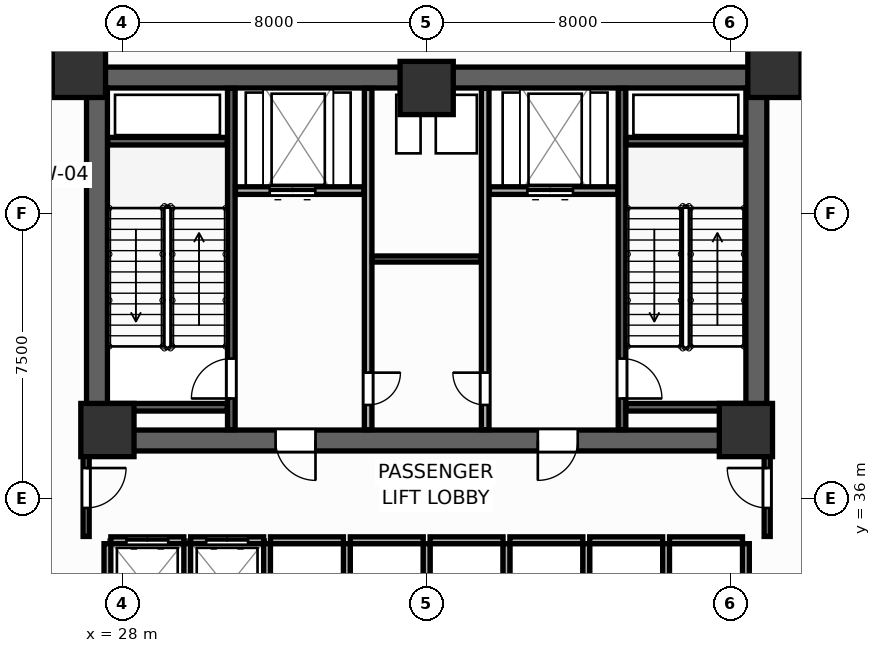
"""IFC4 building model, lengths in metres.
Left out: names, types, materials, properties, quantities, classifications, styles, units other than length and angle.
Written with IfcOpenShell. Run it as: python <this file> out.ifc"""

import sys

from ifc_helpers import new_model, si_unit, direction, frame, frame_2d, origin, origin_2d, place, context, subcontext, project, spatial, rectangle, extrude, source, transform, mapped, element, fill, save


model = new_model("IFC4")
c1 = context("Model", 3, precision=1e-05, world=origin(), true_north=direction((0.0, 1.0)))
c2 = subcontext(c1, "Body", "Model", "MODEL_VIEW")
j1 = project(units=[si_unit("LENGTHUNIT", "METRE"), si_unit("PLANEANGLEUNIT", "RADIAN")], contexts=[c1])
p1 = place(None, origin())
s1 = spatial("IfcSite", under=j1, at=p1, CompositionType="ELEMENT")
p2 = place(p1, origin())
s2 = spatial("IfcBuilding", under=s1, at=p2, CompositionType="ELEMENT")
p3 = place(p2, frame((0.0, 0.0, 4.8)))
s3 = spatial("IfcBuildingStorey", under=s2, at=p3, CompositionType="ELEMENT", Elevation=4.8)
p4 = place(p3, frame((27.05, 47.075, 0.0), z_axis=(0.0, 0.0, 1.0), x_axis=(1.0, 0.0, 0.0)))
e1 = element("IfcWall", 1, at=p4, inside=s3, PredefinedType="SHEAR", context=c2, shape_type="SweptSolid", body=[
    extrude(rectangle(XDim=17.9, YDim=0.55, at=frame_2d((8.95, 0.0))), origin(), (0.0, 0.0, 1.0), 4.8),
])
p5 = place(p3, frame((27.05, 37.525, 0.0), z_axis=(0.0, 0.0, 1.0), x_axis=(1.0, 0.0, 0.0)))
e2 = element("IfcWall", 2, at=p5, inside=s3, PredefinedType="SHEAR", context=c2, shape_type="SweptSolid", body=[
    extrude(rectangle(XDim=17.9, YDim=0.55, at=frame_2d((8.95, 0.0))), origin(), (0.0, 0.0, 1.0), 4.8),
])
p6 = place(p5, frame((4.975, 0.0, 0.0)))
e3 = element("IfcOpeningElement", 3, at=p6, cuts=e2, PredefinedType="OPENING", context=c2, shape_type="SweptSolid", body=[
    extrude(rectangle(XDim=1.05, YDim=2.1, at=frame_2d((0.525, 1.05))), frame((0.0, 0.285, 0.0), z_axis=(0.0, -1.0, 0.0), x_axis=(1.0, 0.0, 0.0)), (0.0, 0.0, 1.0), 0.57),
])
p7 = place(p5, frame((11.875, 0.0, 0.0)))
e4 = element("IfcOpeningElement", 4, at=p7, cuts=e2, PredefinedType="OPENING", context=c2, shape_type="SweptSolid", body=[
    extrude(rectangle(XDim=1.05, YDim=2.1, at=frame_2d((0.525, 1.05))), frame((0.0, 0.285, 0.0), z_axis=(0.0, -1.0, 0.0), x_axis=(1.0, 0.0, 0.0)), (0.0, 0.0, 1.0), 0.57),
])
for number, where, z_axis, x_axis in (
    (5, (27.325, 37.8, 0.0), (0.0, 0.0, 1.0), (0.0, 1.0, 0.0)),
    (6, (44.675, 37.8, 0.0), (0.0, 0.0, 1.0), (0.0, 1.0, 0.0)),
):
    element("IfcWall", number, at=place(p3, frame(where, z_axis=z_axis, x_axis=x_axis)), inside=s3, PredefinedType="SHEAR", context=c2, shape_type="SweptSolid", body=[
        extrude(rectangle(XDim=9.0, YDim=0.55, at=frame_2d((4.5, 0.0))), origin(), (0.0, 0.0, 1.0), 4.8),
    ])
m1 = source(origin(), c2, "Body", "SweptSolid", [
    extrude(rectangle(XDim=1.4, YDim=1.4, at=origin_2d()), origin(), (0.0, 0.0, 1.0), 4.8),
])
for number, where, z_axis, x_axis in (
    (7, (26.85, 47.25, 0.0), (0.0, 0.0, 1.0), (1.0, 0.0, 0.0)),
    (8, (45.15, 47.25, 0.0), (0.0, 0.0, 1.0), (1.0, 0.0, 0.0)),
    (9, (27.6, 37.8, 0.0), (0.0, 0.0, 1.0), (1.0, 0.0, 0.0)),
    (10, (44.4, 37.8, 0.0), (0.0, 0.0, 1.0), (1.0, 0.0, 0.0)),
    (11, (36.0, 46.8, 0.0), (0.0, 0.0, 1.0), (1.0, 0.0, 0.0)),
):
    element("IfcColumn", number, at=place(p3, frame(where, z_axis=z_axis, x_axis=x_axis)), inside=s3, PredefinedType="COLUMN", context=c2, shape_type="MappedRepresentation", body=[
        mapped(m1, transform((0.0, 0.0, 0.0), scale=1.0)),
    ])
p8 = place(p3, frame((30.86, 37.81, 0.0), z_axis=(0.0, 0.0, 1.0), x_axis=(0.0, 1.0, 0.0)))
e12 = element("IfcWall", 12, at=p8, inside=s3, PredefinedType="SHEAR", context=c2, shape_type="SweptSolid", body=[
    extrude(rectangle(XDim=8.98, YDim=0.2, at=frame_2d((4.49, 0.0))), origin(), (0.0, 0.0, 1.0), 4.8),
])
p9 = place(p8, frame((0.82, 0.0, 0.0)))
e13 = element("IfcOpeningElement", 13, at=p9, cuts=e12, PredefinedType="OPENING", context=c2, shape_type="SweptSolid", body=[
    extrude(rectangle(XDim=1.05, YDim=2.1, at=frame_2d((0.525, 1.05))), frame((0.0, 0.11, 0.0), z_axis=(0.0, -1.0, 0.0), x_axis=(1.0, 0.0, 0.0)), (0.0, 0.0, 1.0), 0.22),
])
for number, where, z_axis, x_axis in (
    (14, (27.61, 45.4, 0.0), (0.0, 0.0, 1.0), (1.0, 0.0, 0.0)),
    (15, (27.61, 38.4, 0.0), (0.0, 0.0, 1.0), (1.0, 0.0, 0.0)),
):
    element("IfcWall", number, at=place(p3, frame(where, z_axis=z_axis, x_axis=x_axis)), inside=s3, PredefinedType="SHEAR", context=c2, shape_type="SweptSolid", body=[
        extrude(rectangle(XDim=3.14, YDim=0.2, at=frame_2d((1.57, 0.0))), origin(), (0.0, 0.0, 1.0), 4.8),
    ])
p10 = place(p3, frame((41.14, 37.81, 0.0), z_axis=(0.0, 0.0, 1.0), x_axis=(0.0, 1.0, 0.0)))
e16 = element("IfcWall", 16, at=p10, inside=s3, PredefinedType="SHEAR", context=c2, shape_type="SweptSolid", body=[
    extrude(rectangle(XDim=8.98, YDim=0.2, at=frame_2d((4.49, 0.0))), origin(), (0.0, 0.0, 1.0), 4.8),
])
p11 = place(p10, frame((0.82, 0.0, 0.0)))
e17 = element("IfcOpeningElement", 17, at=p11, cuts=e16, PredefinedType="OPENING", context=c2, shape_type="SweptSolid", body=[
    extrude(rectangle(XDim=1.05, YDim=2.1, at=frame_2d((0.525, 1.05))), frame((0.0, 0.11, 0.0), z_axis=(0.0, -1.0, 0.0), x_axis=(1.0, 0.0, 0.0)), (0.0, 0.0, 1.0), 0.22),
])
for number, where, z_axis, x_axis in (
    (18, (41.25, 45.4, 0.0), (0.0, 0.0, 1.0), (1.0, 0.0, 0.0)),
    (19, (41.25, 38.4, 0.0), (0.0, 0.0, 1.0), (1.0, 0.0, 0.0)),
):
    element("IfcWall", number, at=place(p3, frame(where, z_axis=z_axis, x_axis=x_axis)), inside=s3, PredefinedType="SHEAR", context=c2, shape_type="SweptSolid", body=[
        extrude(rectangle(XDim=3.14, YDim=0.2, at=frame_2d((1.57, 0.0))), origin(), (0.0, 0.0, 1.0), 4.8),
    ])
p12 = place(p3, frame((30.97, 44.1, 0.0), z_axis=(0.0, 0.0, 1.0), x_axis=(1.0, 0.0, 0.0)))
e20 = element("IfcWall", 20, at=p12, inside=s3, PredefinedType="PARTITIONING", context=c2, shape_type="SweptSolid", body=[
    extrude(rectangle(XDim=3.38, YDim=0.2, at=frame_2d((1.69, 0.0))), origin(), (0.0, 0.0, 1.0), 4.52),
])
p13 = place(p12, frame((0.9, 0.0, 0.0)))
e21 = element("IfcOpeningElement", 21, at=p13, cuts=e20, PredefinedType="OPENING", context=c2, shape_type="SweptSolid", body=[
    extrude(rectangle(XDim=1.2, YDim=2.1, at=frame_2d((0.6, 1.05))), frame((0.0, 0.11, 0.0), z_axis=(0.0, -1.0, 0.0), x_axis=(1.0, 0.0, 0.0)), (0.0, 0.0, 1.0), 0.22),
])
p14 = place(p3, frame((37.65, 44.1, 0.0), z_axis=(0.0, 0.0, 1.0), x_axis=(1.0, 0.0, 0.0)))
e22 = element("IfcWall", 22, at=p14, inside=s3, PredefinedType="PARTITIONING", context=c2, shape_type="SweptSolid", body=[
    extrude(rectangle(XDim=3.38, YDim=0.2, at=frame_2d((1.69, 0.0))), origin(), (0.0, 0.0, 1.0), 4.52),
])
p15 = place(p14, frame((1.0, 0.0, 0.0)))
e23 = element("IfcOpeningElement", 23, at=p15, cuts=e22, PredefinedType="OPENING", context=c2, shape_type="SweptSolid", body=[
    extrude(rectangle(XDim=1.2, YDim=2.1, at=frame_2d((0.6, 1.05))), frame((0.0, 0.11, 0.0), z_axis=(0.0, -1.0, 0.0), x_axis=(1.0, 0.0, 0.0)), (0.0, 0.0, 1.0), 0.22),
])
p16 = place(p3, frame((34.46, 37.81, 0.0), z_axis=(0.0, 0.0, 1.0), x_axis=(0.0, 1.0, 0.0)))
e24 = element("IfcWall", 24, at=p16, inside=s3, PredefinedType="PARTITIONING", context=c2, shape_type="SweptSolid", body=[
    extrude(rectangle(XDim=8.98, YDim=0.2, at=frame_2d((4.49, 0.0))), origin(), (0.0, 0.0, 1.0), 4.52),
])
p17 = place(p16, frame((0.65, 0.0, 0.0)))
e25 = element("IfcOpeningElement", 25, at=p17, cuts=e24, PredefinedType="OPENING", context=c2, shape_type="SweptSolid", body=[
    extrude(rectangle(XDim=0.85, YDim=2.05, at=frame_2d((0.425, 1.025))), frame((0.0, 0.11, 0.0), z_axis=(0.0, -1.0, 0.0), x_axis=(1.0, 0.0, 0.0)), (0.0, 0.0, 1.0), 0.22),
])
p18 = place(p3, frame((37.54, 37.81, 0.0), z_axis=(0.0, 0.0, 1.0), x_axis=(0.0, 1.0, 0.0)))
e26 = element("IfcWall", 26, at=p18, inside=s3, PredefinedType="PARTITIONING", context=c2, shape_type="SweptSolid", body=[
    extrude(rectangle(XDim=8.98, YDim=0.2, at=frame_2d((4.49, 0.0))), origin(), (0.0, 0.0, 1.0), 4.52),
])
p19 = place(p18, frame((0.65, 0.0, 0.0)))
e27 = element("IfcOpeningElement", 27, at=p19, cuts=e26, PredefinedType="OPENING", context=c2, shape_type="SweptSolid", body=[
    extrude(rectangle(XDim=0.85, YDim=2.05, at=frame_2d((0.425, 1.025))), frame((0.0, 0.11, 0.0), z_axis=(0.0, -1.0, 0.0), x_axis=(1.0, 0.0, 0.0)), (0.0, 0.0, 1.0), 0.22),
])
p20 = place(p3, frame((34.57, 42.3, 0.0), z_axis=(0.0, 0.0, 1.0), x_axis=(1.0, 0.0, 0.0)))
e28 = element("IfcWall", 28, at=p20, inside=s3, PredefinedType="PARTITIONING", context=c2, shape_type="SweptSolid", body=[
    extrude(rectangle(XDim=2.86, YDim=0.16, at=frame_2d((1.43, 0.0))), origin(), (0.0, 0.0, 1.0), 4.52),
])
p21 = place(p3, frame((27.69, 34.9, 0.0), z_axis=(0.0, 0.0, 1.0), x_axis=(1.0, 0.0, 0.0)))
e29 = element("IfcWall", 29, at=p21, inside=s3, PredefinedType="PARTITIONING", context=c2, shape_type="SweptSolid", body=[
    extrude(rectangle(XDim=1.92, YDim=0.18, at=frame_2d((0.96, 0.0))), origin(), (0.0, 0.0, 1.0), 4.52),
])
p22 = place(p21, frame((0.41, 0.0, 0.0)))
e30 = element("IfcOpeningElement", 30, at=p22, cuts=e29, PredefinedType="OPENING", context=c2, shape_type="SweptSolid", body=[
    extrude(rectangle(XDim=1.1, YDim=2.1, at=frame_2d((0.55, 1.05))), frame((0.0, 0.1, 0.0), z_axis=(0.0, -1.0, 0.0), x_axis=(1.0, 0.0, 0.0)), (0.0, 0.0, 1.0), 0.2),
])
p23 = place(p3, frame((27.6, 32.49, 0.0), z_axis=(0.0, 0.0, 1.0), x_axis=(0.0, 1.0, 0.0)))
e31 = element("IfcWall", 31, at=p23, inside=s3, PredefinedType="PARTITIONING", context=c2, shape_type="SweptSolid", body=[
    extrude(rectangle(XDim=2.32, YDim=0.18, at=frame_2d((1.16, 0.0))), origin(), (0.0, 0.0, 1.0), 4.52),
])
p24 = place(p3, frame((29.79, 34.9, 0.0), z_axis=(0.0, 0.0, 1.0), x_axis=(1.0, 0.0, 0.0)))
e32 = element("IfcWall", 32, at=p24, inside=s3, PredefinedType="PARTITIONING", context=c2, shape_type="SweptSolid", body=[
    extrude(rectangle(XDim=1.92, YDim=0.18, at=frame_2d((0.96, 0.0))), origin(), (0.0, 0.0, 1.0), 4.52),
])
p25 = place(p24, frame((0.41, 0.0, 0.0)))
e33 = element("IfcOpeningElement", 33, at=p25, cuts=e32, PredefinedType="OPENING", context=c2, shape_type="SweptSolid", body=[
    extrude(rectangle(XDim=1.1, YDim=2.1, at=frame_2d((0.55, 1.05))), frame((0.0, 0.1, 0.0), z_axis=(0.0, -1.0, 0.0), x_axis=(1.0, 0.0, 0.0)), (0.0, 0.0, 1.0), 0.2),
])
p26 = place(p3, frame((29.7, 32.49, 0.0), z_axis=(0.0, 0.0, 1.0), x_axis=(0.0, 1.0, 0.0)))
e34 = element("IfcWall", 34, at=p26, inside=s3, PredefinedType="PARTITIONING", context=c2, shape_type="SweptSolid", body=[
    extrude(rectangle(XDim=2.32, YDim=0.18, at=frame_2d((1.16, 0.0))), origin(), (0.0, 0.0, 1.0), 4.52),
])
p27 = place(p3, frame((31.89, 34.9, 0.0), z_axis=(0.0, 0.0, 1.0), x_axis=(1.0, 0.0, 0.0)))
e35 = element("IfcWall", 35, at=p27, inside=s3, PredefinedType="PARTITIONING", context=c2, shape_type="SweptSolid", body=[
    extrude(rectangle(XDim=1.92, YDim=0.18, at=frame_2d((0.96, 0.0))), origin(), (0.0, 0.0, 1.0), 4.52),
])
p28 = place(p3, frame((31.8, 32.49, 0.0), z_axis=(0.0, 0.0, 1.0), x_axis=(0.0, 1.0, 0.0)))
e36 = element("IfcWall", 36, at=p28, inside=s3, PredefinedType="PARTITIONING", context=c2, shape_type="SweptSolid", body=[
    extrude(rectangle(XDim=2.32, YDim=0.18, at=frame_2d((1.16, 0.0))), origin(), (0.0, 0.0, 1.0), 4.52),
])
p29 = place(p3, frame((33.99, 34.9, 0.0), z_axis=(0.0, 0.0, 1.0), x_axis=(1.0, 0.0, 0.0)))
e37 = element("IfcWall", 37, at=p29, inside=s3, PredefinedType="PARTITIONING", context=c2, shape_type="SweptSolid", body=[
    extrude(rectangle(XDim=1.92, YDim=0.18, at=frame_2d((0.96, 0.0))), origin(), (0.0, 0.0, 1.0), 4.52),
])
p30 = place(p3, frame((33.9, 32.49, 0.0), z_axis=(0.0, 0.0, 1.0), x_axis=(0.0, 1.0, 0.0)))
e38 = element("IfcWall", 38, at=p30, inside=s3, PredefinedType="PARTITIONING", context=c2, shape_type="SweptSolid", body=[
    extrude(rectangle(XDim=2.32, YDim=0.18, at=frame_2d((1.16, 0.0))), origin(), (0.0, 0.0, 1.0), 4.52),
])
p31 = place(p3, frame((36.09, 34.9, 0.0), z_axis=(0.0, 0.0, 1.0), x_axis=(1.0, 0.0, 0.0)))
e39 = element("IfcWall", 39, at=p31, inside=s3, PredefinedType="PARTITIONING", context=c2, shape_type="SweptSolid", body=[
    extrude(rectangle(XDim=1.92, YDim=0.18, at=frame_2d((0.96, 0.0))), origin(), (0.0, 0.0, 1.0), 4.52),
])
p32 = place(p3, frame((36.0, 32.49, 0.0), z_axis=(0.0, 0.0, 1.0), x_axis=(0.0, 1.0, 0.0)))
e40 = element("IfcWall", 40, at=p32, inside=s3, PredefinedType="PARTITIONING", context=c2, shape_type="SweptSolid", body=[
    extrude(rectangle(XDim=2.32, YDim=0.18, at=frame_2d((1.16, 0.0))), origin(), (0.0, 0.0, 1.0), 4.52),
])
p33 = place(p3, frame((38.19, 34.9, 0.0), z_axis=(0.0, 0.0, 1.0), x_axis=(1.0, 0.0, 0.0)))
e41 = element("IfcWall", 41, at=p33, inside=s3, PredefinedType="PARTITIONING", context=c2, shape_type="SweptSolid", body=[
    extrude(rectangle(XDim=1.92, YDim=0.18, at=frame_2d((0.96, 0.0))), origin(), (0.0, 0.0, 1.0), 4.52),
])
p34 = place(p3, frame((38.1, 32.49, 0.0), z_axis=(0.0, 0.0, 1.0), x_axis=(0.0, 1.0, 0.0)))
e42 = element("IfcWall", 42, at=p34, inside=s3, PredefinedType="PARTITIONING", context=c2, shape_type="SweptSolid", body=[
    extrude(rectangle(XDim=2.32, YDim=0.18, at=frame_2d((1.16, 0.0))), origin(), (0.0, 0.0, 1.0), 4.52),
])
p35 = place(p3, frame((40.29, 34.9, 0.0), z_axis=(0.0, 0.0, 1.0), x_axis=(1.0, 0.0, 0.0)))
e43 = element("IfcWall", 43, at=p35, inside=s3, PredefinedType="PARTITIONING", context=c2, shape_type="SweptSolid", body=[
    extrude(rectangle(XDim=1.92, YDim=0.18, at=frame_2d((0.96, 0.0))), origin(), (0.0, 0.0, 1.0), 4.52),
])
p36 = place(p3, frame((40.2, 32.49, 0.0), z_axis=(0.0, 0.0, 1.0), x_axis=(0.0, 1.0, 0.0)))
e44 = element("IfcWall", 44, at=p36, inside=s3, PredefinedType="PARTITIONING", context=c2, shape_type="SweptSolid", body=[
    extrude(rectangle(XDim=2.32, YDim=0.18, at=frame_2d((1.16, 0.0))), origin(), (0.0, 0.0, 1.0), 4.52),
])
p37 = place(p3, frame((42.39, 34.9, 0.0), z_axis=(0.0, 0.0, 1.0), x_axis=(1.0, 0.0, 0.0)))
e45 = element("IfcWall", 45, at=p37, inside=s3, PredefinedType="PARTITIONING", context=c2, shape_type="SweptSolid", body=[
    extrude(rectangle(XDim=1.92, YDim=0.18, at=frame_2d((0.96, 0.0))), origin(), (0.0, 0.0, 1.0), 4.52),
])
for number, where, z_axis, x_axis in (
    (46, (42.3, 32.49, 0.0), (0.0, 0.0, 1.0), (0.0, 1.0, 0.0)),
    (47, (44.4, 32.49, 0.0), (0.0, 0.0, 1.0), (0.0, 1.0, 0.0)),
):
    element("IfcWall", number, at=place(p3, frame(where, z_axis=z_axis, x_axis=x_axis)), inside=s3, PredefinedType="PARTITIONING", context=c2, shape_type="SweptSolid", body=[
        extrude(rectangle(XDim=2.32, YDim=0.18, at=frame_2d((1.16, 0.0))), origin(), (0.0, 0.0, 1.0), 4.52),
    ])
p38 = place(p3, frame((27.04, 35.0, 0.0), z_axis=(0.0, 0.0, 1.0), x_axis=(0.0, 1.0, 0.0)))
e48 = element("IfcWall", 48, at=p38, inside=s3, PredefinedType="PARTITIONING", context=c2, shape_type="SweptSolid", body=[
    extrude(rectangle(XDim=2.65, YDim=0.16, at=frame_2d((1.325, 0.0))), origin(), (0.0, 0.0, 1.0), 4.52),
])
p39 = place(p38, frame((0.75, 0.0, 0.0)))
e49 = element("IfcOpeningElement", 49, at=p39, cuts=e48, PredefinedType="OPENING", context=c2, shape_type="SweptSolid", body=[
    extrude(rectangle(XDim=1.05, YDim=2.1, at=frame_2d((0.525, 1.05))), frame((0.0, 0.09, 0.0), z_axis=(0.0, -1.0, 0.0), x_axis=(1.0, 0.0, 0.0)), (0.0, 0.0, 1.0), 0.18),
])
p40 = place(p3, frame((44.96, 35.0, 0.0), z_axis=(0.0, 0.0, 1.0), x_axis=(0.0, 1.0, 0.0)))
e50 = element("IfcWall", 50, at=p40, inside=s3, PredefinedType="PARTITIONING", context=c2, shape_type="SweptSolid", body=[
    extrude(rectangle(XDim=2.65, YDim=0.16, at=frame_2d((1.325, 0.0))), origin(), (0.0, 0.0, 1.0), 4.52),
])
p41 = place(p40, frame((0.75, 0.0, 0.0)))
e51 = element("IfcOpeningElement", 51, at=p41, cuts=e50, PredefinedType="OPENING", context=c2, shape_type="SweptSolid", body=[
    extrude(rectangle(XDim=1.05, YDim=2.1, at=frame_2d((0.525, 1.05))), frame((0.0, 0.09, 0.0), z_axis=(0.0, -1.0, 0.0), x_axis=(1.0, 0.0, 0.0)), (0.0, 0.0, 1.0), 0.18),
])
p42 = place(p3, frame((27.035, 47.34, 0.0), z_axis=(0.0, 0.0, 1.0), x_axis=(0.0, 1.0, 0.0)))
e52 = element("IfcWall", 52, at=p42, inside=s3, PredefinedType="PARTITIONING", context=c2, shape_type="SweptSolid", body=[
    extrude(rectangle(XDim=11.64, YDim=0.16, at=frame_2d((5.82, 0.0))), origin(), (0.0, 0.0, 1.0), 4.52),
])
p43 = place(p42, frame((5.238, 0.0, 0.0)))
e53 = element("IfcOpeningElement", 53, at=p43, cuts=e52, PredefinedType="OPENING", context=c2, shape_type="SweptSolid", body=[
    extrude(rectangle(XDim=0.95, YDim=2.05, at=frame_2d((0.475, 1.025))), frame((0.0, 0.09, 0.0), z_axis=(0.0, -1.0, 0.0), x_axis=(1.0, 0.0, 0.0)), (0.0, 0.0, 1.0), 0.18),
])
p44 = place(p3, frame((44.965, 47.34, 0.0), z_axis=(0.0, 0.0, 1.0), x_axis=(0.0, 1.0, 0.0)))
e54 = element("IfcWall", 54, at=p44, inside=s3, PredefinedType="PARTITIONING", context=c2, shape_type="SweptSolid", body=[
    extrude(rectangle(XDim=11.64, YDim=0.16, at=frame_2d((5.82, 0.0))), origin(), (0.0, 0.0, 1.0), 4.52),
])
p45 = place(p9, origin())
e55 = element("IfcDoor", 55, at=p45, inside=s3, OperationType="SINGLE_SWING_LEFT", PredefinedType="DOOR", context=c2, shape_type="SweptSolid", body=[
    extrude(rectangle(XDim=1.05, YDim=2.1, at=frame_2d((0.525, 1.05))), frame((0.0, 0.025, 0.0), z_axis=(0.0, -1.0, 0.0), x_axis=(1.0, 0.0, 0.0)), (0.0, 0.0, 1.0), 0.05),
])
fill(e13, e55)
p46 = place(p11, frame((1.05, 0.0, 0.0), z_axis=(0.0, 0.0, 1.0), x_axis=(-1.0, 0.0, 0.0)))
e56 = element("IfcDoor", 56, at=p46, inside=s3, OperationType="SINGLE_SWING_RIGHT", PredefinedType="DOOR", context=c2, shape_type="SweptSolid", body=[
    extrude(rectangle(XDim=1.05, YDim=2.1, at=frame_2d((0.525, 1.05))), frame((0.0, 0.025, 0.0), z_axis=(0.0, -1.0, 0.0), x_axis=(1.0, 0.0, 0.0)), (0.0, 0.0, 1.0), 0.05),
])
fill(e17, e56)
p47 = place(p13, origin())
e57 = element("IfcDoor", 57, at=p47, inside=s3, OperationType="DOUBLE_DOOR_SLIDING", PredefinedType="DOOR", context=c2, shape_type="SweptSolid", body=[
    extrude(rectangle(XDim=1.2, YDim=2.1, at=frame_2d((0.6, 1.05))), frame((0.0, 0.025, 0.0), z_axis=(0.0, -1.0, 0.0), x_axis=(1.0, 0.0, 0.0)), (0.0, 0.0, 1.0), 0.05),
])
fill(e21, e57)
p48 = place(p15, origin())
e58 = element("IfcDoor", 58, at=p48, inside=s3, OperationType="DOUBLE_DOOR_SLIDING", PredefinedType="DOOR", context=c2, shape_type="SweptSolid", body=[
    extrude(rectangle(XDim=1.2, YDim=2.1, at=frame_2d((0.6, 1.05))), frame((0.0, 0.025, 0.0), z_axis=(0.0, -1.0, 0.0), x_axis=(1.0, 0.0, 0.0)), (0.0, 0.0, 1.0), 0.05),
])
fill(e23, e58)
p49 = place(p17, frame((0.85, 0.0, 0.0), z_axis=(0.0, 0.0, 1.0), x_axis=(-1.0, 0.0, 0.0)))
e59 = element("IfcDoor", 59, at=p49, inside=s3, OperationType="SINGLE_SWING_LEFT", PredefinedType="DOOR", context=c2, shape_type="SweptSolid", body=[
    extrude(rectangle(XDim=0.85, YDim=2.05, at=frame_2d((0.425, 1.025))), frame((0.0, 0.025, 0.0), z_axis=(0.0, -1.0, 0.0), x_axis=(1.0, 0.0, 0.0)), (0.0, 0.0, 1.0), 0.05),
])
fill(e25, e59)
p50 = place(p19, origin())
e60 = element("IfcDoor", 60, at=p50, inside=s3, OperationType="SINGLE_SWING_RIGHT", PredefinedType="DOOR", context=c2, shape_type="SweptSolid", body=[
    extrude(rectangle(XDim=0.85, YDim=2.05, at=frame_2d((0.425, 1.025))), frame((0.0, 0.025, 0.0), z_axis=(0.0, -1.0, 0.0), x_axis=(1.0, 0.0, 0.0)), (0.0, 0.0, 1.0), 0.05),
])
fill(e27, e60)
p51 = place(p22, origin())
e61 = element("IfcDoor", 61, at=p51, inside=s3, OperationType="DOUBLE_DOOR_SLIDING", PredefinedType="DOOR", context=c2, shape_type="SweptSolid", body=[
    extrude(rectangle(XDim=1.1, YDim=2.1, at=frame_2d((0.55, 1.05))), frame((0.0, 0.025, 0.0), z_axis=(0.0, -1.0, 0.0), x_axis=(1.0, 0.0, 0.0)), (0.0, 0.0, 1.0), 0.05),
])
fill(e30, e61)
p52 = place(p25, origin())
e62 = element("IfcDoor", 62, at=p52, inside=s3, OperationType="DOUBLE_DOOR_SLIDING", PredefinedType="DOOR", context=c2, shape_type="SweptSolid", body=[
    extrude(rectangle(XDim=1.1, YDim=2.1, at=frame_2d((0.55, 1.05))), frame((0.0, 0.025, 0.0), z_axis=(0.0, -1.0, 0.0), x_axis=(1.0, 0.0, 0.0)), (0.0, 0.0, 1.0), 0.05),
])
fill(e33, e62)
p53 = place(p39, frame((1.05, 0.0, 0.0), z_axis=(0.0, 0.0, 1.0), x_axis=(-1.0, 0.0, 0.0)))
e63 = element("IfcDoor", 63, at=p53, inside=s3, OperationType="SINGLE_SWING_LEFT", PredefinedType="DOOR", context=c2, shape_type="SweptSolid", body=[
    extrude(rectangle(XDim=1.05, YDim=2.1, at=frame_2d((0.525, 1.05))), frame((0.0, 0.025, 0.0), z_axis=(0.0, -1.0, 0.0), x_axis=(1.0, 0.0, 0.0)), (0.0, 0.0, 1.0), 0.05),
])
fill(e49, e63)
p54 = place(p41, origin())
e64 = element("IfcDoor", 64, at=p54, inside=s3, OperationType="SINGLE_SWING_RIGHT", PredefinedType="DOOR", context=c2, shape_type="SweptSolid", body=[
    extrude(rectangle(XDim=1.05, YDim=2.1, at=frame_2d((0.525, 1.05))), frame((0.0, 0.025, 0.0), z_axis=(0.0, -1.0, 0.0), x_axis=(1.0, 0.0, 0.0)), (0.0, 0.0, 1.0), 0.05),
])
fill(e51, e64)
p55 = place(p6, frame((1.05, 0.0, 0.0), z_axis=(0.0, 0.0, 1.0), x_axis=(-1.0, 0.0, 0.0)))
e65 = element("IfcDoor", 65, at=p55, inside=s3, OperationType="SINGLE_SWING_LEFT", PredefinedType="DOOR", context=c2, shape_type="SweptSolid", body=[
    extrude(rectangle(XDim=1.05, YDim=2.1, at=frame_2d((0.525, 1.05))), frame((0.0, 0.025, 0.0), z_axis=(0.0, -1.0, 0.0), x_axis=(1.0, 0.0, 0.0)), (0.0, 0.0, 1.0), 0.05),
])
fill(e3, e65)
p56 = place(p7, frame((1.05, 0.0, 0.0), z_axis=(0.0, 0.0, 1.0), x_axis=(-1.0, 0.0, 0.0)))
e66 = element("IfcDoor", 66, at=p56, inside=s3, OperationType="SINGLE_SWING_RIGHT", PredefinedType="DOOR", context=c2, shape_type="SweptSolid", body=[
    extrude(rectangle(XDim=1.05, YDim=2.1, at=frame_2d((0.525, 1.05))), frame((0.0, 0.025, 0.0), z_axis=(0.0, -1.0, 0.0), x_axis=(1.0, 0.0, 0.0)), (0.0, 0.0, 1.0), 0.05),
])
fill(e4, e66)
save(model, sys.argv[1])
